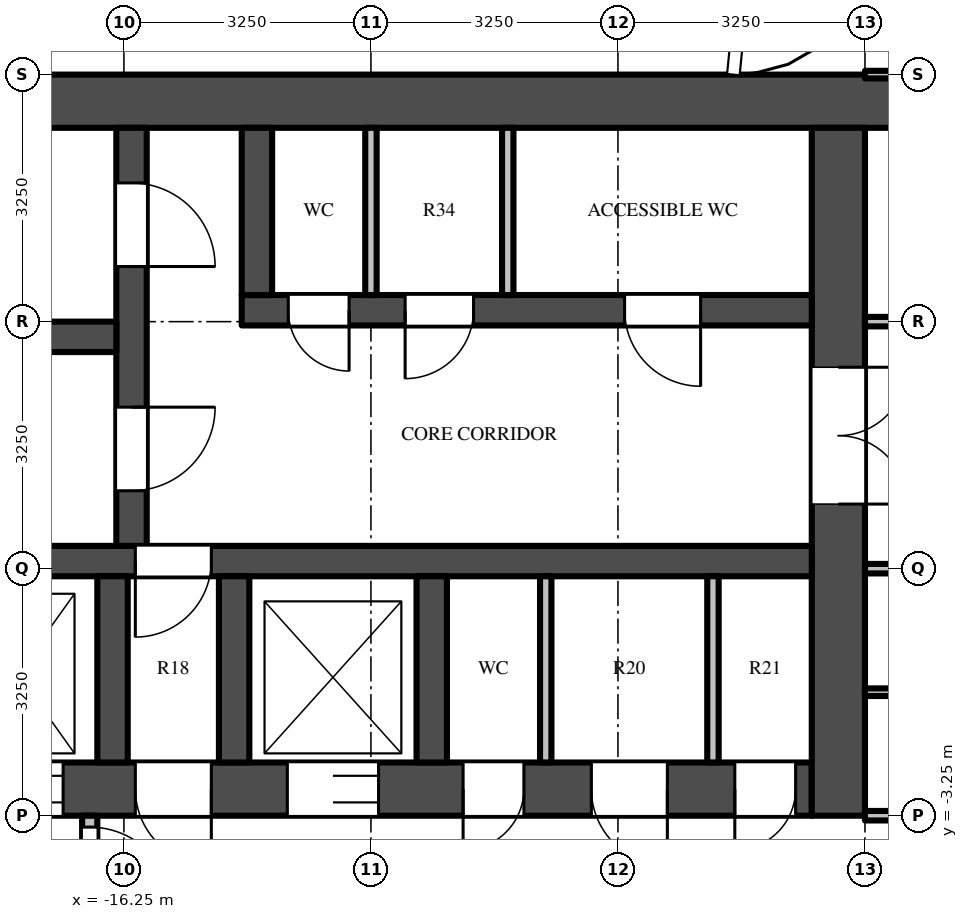
"""IFC4 building model, lengths in metres.
Left out: names, types, materials, properties, quantities, classifications, styles, units other than length and angle.
Written with IfcOpenShell. Run it as: python <this file> out.ifc"""

import sys

from ifc_helpers import new_model, si_unit, direction, frame, frame_2d, origin, place, context, subcontext, project, spatial, rectangle, extrude, source, transform, mapped, element, fill, save


model = new_model("IFC4")
c1 = context("Model", 3, precision=1e-05, world=origin(), true_north=direction((0.0, 1.0)))
c2 = subcontext(c1, "Body", "Model", "MODEL_VIEW")
j1 = project(units=[si_unit("LENGTHUNIT", "METRE"), si_unit("PLANEANGLEUNIT", "RADIAN")], contexts=[c1])
p1 = place(None, origin())
s1 = spatial("IfcSite", under=j1, at=p1, CompositionType="ELEMENT")
p2 = place(p1, origin())
s2 = spatial("IfcBuilding", under=s1, at=p2, CompositionType="ELEMENT")
p3 = place(p2, frame((0.0, 0.0, 291.1)))
s3 = spatial("IfcBuildingStorey", under=s2, at=p3, CompositionType="ELEMENT", Elevation=291.1)
m1 = source(origin(), c2, "Body", "SweptSolid", [
    extrude(rectangle(XDim=16.65, YDim=0.7, at=frame_2d((8.325, 0.0))), origin(), (0.0, 0.0, 1.0), 3.7),
])
p4 = place(p3, frame((-6.1, 6.15, 0.0), z_axis=(0.0, 0.0, 1.0), x_axis=(-1.0, 0.0, 0.0)))
e1 = element("IfcWall", 1, at=p4, inside=s3, PredefinedType="SHEAR", context=c2, shape_type="MappedRepresentation", body=[
    mapped(m1, transform((0.0, 0.0, 0.0))),
])
m2 = source(origin(), c2, "Body", "SweptSolid", [
    extrude(rectangle(XDim=14.85, YDim=0.7, at=frame_2d((7.425, 0.0))), origin(), (0.0, 0.0, 1.0), 3.7),
])
p5 = place(p3, frame((-7.2, -2.9, 0.0), z_axis=(0.0, 0.0, 1.0), x_axis=(-1.0, 0.0, 0.0)))
e2 = element("IfcWall", 2, at=p5, inside=s3, PredefinedType="SHEAR", context=c2, shape_type="MappedRepresentation", body=[
    mapped(m2, transform((0.0, 0.0, 0.0))),
])
m3 = source(origin(), c2, "Body", "SweptSolid", [
    extrude(rectangle(XDim=1.2, YDim=2.1, at=frame_2d((0.6, 1.05))), frame((0.0, 0.36, 0.0), z_axis=(0.0, -1.0, 0.0), x_axis=(1.0, 0.0, 0.0)), (0.0, 0.0, 1.0), 0.72),
])
p6 = place(p5, frame((5.7, 0.0, 0.0)))
e3 = element("IfcOpeningElement", 3, at=p6, cuts=e2, PredefinedType="OPENING", context=c2, shape_type="MappedRepresentation", body=[
    mapped(m3, transform((0.0, 0.0, 0.0))),
])
m4 = source(origin(), c2, "Body", "SweptSolid", [
    extrude(rectangle(XDim=1.3, YDim=2.1, at=frame_2d((0.65, 1.05))), frame((0.0, 0.36, 0.0), z_axis=(0.0, -1.0, 0.0), x_axis=(1.0, 0.0, 0.0)), (0.0, 0.0, 1.0), 0.72),
])
p7 = place(p5, frame((12.2, 0.0, 0.0)))
e4 = element("IfcOpeningElement", 4, at=p7, cuts=e2, PredefinedType="OPENING", context=c2, shape_type="MappedRepresentation", body=[
    mapped(m4, transform((0.0, 0.0, 0.0))),
])
p8 = place(p5, frame((9.85, 0.0, 0.0)))
e5 = element("IfcOpeningElement", 5, at=p8, cuts=e2, PredefinedType="OPENING", context=c2, shape_type="MappedRepresentation", body=[
    mapped(m3, transform((0.0, 0.0, 0.0))),
])
m5 = source(origin(), c2, "Body", "SweptSolid", [
    extrude(rectangle(XDim=1.0, YDim=2.1, at=frame_2d((0.5, 1.05))), frame((0.0, 0.36, 0.0), z_axis=(0.0, -1.0, 0.0), x_axis=(1.0, 0.0, 0.0)), (0.0, 0.0, 1.0), 0.72),
])
p9 = place(p5, frame((7.9, 0.0, 0.0)))
e6 = element("IfcOpeningElement", 6, at=p9, cuts=e2, PredefinedType="OPENING", context=c2, shape_type="MappedRepresentation", body=[
    mapped(m5, transform((0.0, 0.0, 0.0))),
])
m6 = source(origin(), c2, "Body", "SweptSolid", [
    extrude(rectangle(XDim=0.8, YDim=2.1, at=frame_2d((0.4, 1.05))), frame((0.0, 0.36, 0.0), z_axis=(0.0, -1.0, 0.0), x_axis=(1.0, 0.0, 0.0)), (0.0, 0.0, 1.0), 0.72),
])
p10 = place(p5, frame((0.212, 0.0, 0.0)))
e7 = element("IfcOpeningElement", 7, at=p10, cuts=e2, PredefinedType="OPENING", context=c2, shape_type="MappedRepresentation", body=[
    mapped(m6, transform((0.0, 0.0, 0.0))),
])
p11 = place(p5, frame((1.9, 0.0, 0.0)))
e8 = element("IfcOpeningElement", 8, at=p11, cuts=e2, PredefinedType="OPENING", context=c2, shape_type="MappedRepresentation", body=[
    mapped(m5, transform((0.0, 0.0, 0.0))),
])
p12 = place(p5, frame((3.788, 0.0, 0.0)))
e9 = element("IfcOpeningElement", 9, at=p12, cuts=e2, PredefinedType="OPENING", context=c2, shape_type="MappedRepresentation", body=[
    mapped(m6, transform((0.0, 0.0, 0.0))),
])
m7 = source(origin(), c2, "Body", "SweptSolid", [
    extrude(rectangle(XDim=9.05, YDim=0.7, at=frame_2d((4.525, 0.0))), origin(), (0.0, 0.0, 1.0), 3.7),
])
p13 = place(p3, frame((-6.85, 5.8, 0.0), z_axis=(0.0, 0.0, 1.0), x_axis=(0.0, -1.0, 0.0)))
e10 = element("IfcWall", 10, at=p13, inside=s3, PredefinedType="SHEAR", context=c2, shape_type="MappedRepresentation", body=[
    mapped(m7, transform((0.0, 0.0, 0.0))),
])
m8 = source(origin(), c2, "Body", "SweptSolid", [
    extrude(rectangle(XDim=1.8, YDim=2.1, at=frame_2d((0.9, 1.05))), frame((0.0, 0.36, 0.0), z_axis=(0.0, -1.0, 0.0), x_axis=(1.0, 0.0, 0.0)), (0.0, 0.0, 1.0), 0.72),
])
p14 = place(p13, frame((3.15, 0.0, 0.0)))
e11 = element("IfcOpeningElement", 11, at=p14, cuts=e10, PredefinedType="OPENING", context=c2, shape_type="MappedRepresentation", body=[
    mapped(m8, transform((0.0, 0.0, 0.0))),
])
m9 = source(origin(), c2, "Body", "SweptSolid", [
    extrude(rectangle(XDim=7.5, YDim=0.4, at=frame_2d((3.75, 0.0))), origin(), (0.0, 0.0, 1.0), 3.7),
])
p15 = place(p3, frame((-7.2, 3.4, 0.0), z_axis=(0.0, 0.0, 1.0), x_axis=(-1.0, 0.0, 0.0)))
e12 = element("IfcWall", 12, at=p15, inside=s3, PredefinedType="SHEAR", context=c2, shape_type="MappedRepresentation", body=[
    mapped(m9, transform((0.0, 0.0, 0.0))),
])
m10 = source(origin(), c2, "Body", "SweptSolid", [
    extrude(rectangle(XDim=1.0, YDim=2.1, at=frame_2d((0.5, 1.05))), frame((0.0, 0.21, 0.0), z_axis=(0.0, -1.0, 0.0), x_axis=(1.0, 0.0, 0.0)), (0.0, 0.0, 1.0), 0.42),
])
p16 = place(p15, frame((1.462, 0.0, 0.0)))
e13 = element("IfcOpeningElement", 13, at=p16, cuts=e12, PredefinedType="OPENING", context=c2, shape_type="MappedRepresentation", body=[
    mapped(m10, transform((0.0, 0.0, 0.0))),
])
m11 = source(origin(), c2, "Body", "SweptSolid", [
    extrude(rectangle(XDim=0.9, YDim=2.1, at=frame_2d((0.45, 1.05))), frame((0.0, 0.21, 0.0), z_axis=(0.0, -1.0, 0.0), x_axis=(1.0, 0.0, 0.0)), (0.0, 0.0, 1.0), 0.42),
])
p17 = place(p15, frame((4.45, 0.0, 0.0)))
e14 = element("IfcOpeningElement", 14, at=p17, cuts=e12, PredefinedType="OPENING", context=c2, shape_type="MappedRepresentation", body=[
    mapped(m11, transform((0.0, 0.0, 0.0))),
])
m12 = source(origin(), c2, "Body", "SweptSolid", [
    extrude(rectangle(XDim=0.8, YDim=2.1, at=frame_2d((0.4, 1.05))), frame((0.0, 0.21, 0.0), z_axis=(0.0, -1.0, 0.0), x_axis=(1.0, 0.0, 0.0)), (0.0, 0.0, 1.0), 0.42),
])
p18 = place(p15, frame((6.087, 0.0, 0.0)))
e15 = element("IfcOpeningElement", 15, at=p18, cuts=e12, PredefinedType="OPENING", context=c2, shape_type="MappedRepresentation", body=[
    mapped(m12, transform((0.0, 0.0, 0.0))),
])
m13 = source(origin(), c2, "Body", "SweptSolid", [
    extrude(rectangle(XDim=14.85, YDim=0.4, at=frame_2d((7.425, 0.0))), origin(), (0.0, 0.0, 1.0), 3.7),
])
p19 = place(p3, frame((-7.2, 0.1, 0.0), z_axis=(0.0, 0.0, 1.0), x_axis=(-1.0, 0.0, 0.0)))
e16 = element("IfcWall", 16, at=p19, inside=s3, PredefinedType="SHEAR", context=c2, shape_type="MappedRepresentation", body=[
    mapped(m13, transform((0.0, 0.0, 0.0))),
])
p20 = place(p19, frame((7.9, 0.0, 0.0)))
e17 = element("IfcOpeningElement", 17, at=p20, cuts=e16, PredefinedType="OPENING", context=c2, shape_type="MappedRepresentation", body=[
    mapped(m10, transform((0.0, 0.0, 0.0))),
])
m14 = source(origin(), c2, "Body", "SweptSolid", [
    extrude(rectangle(XDim=5.5, YDim=0.4, at=frame_2d((2.75, 0.0))), origin(), (0.0, 0.0, 1.0), 3.7),
])
p21 = place(p3, frame((-16.15, 5.8, 0.0), z_axis=(0.0, 0.0, 1.0), x_axis=(0.0, -1.0, 0.0)))
e18 = element("IfcWall", 18, at=p21, inside=s3, PredefinedType="SHEAR", context=c2, shape_type="MappedRepresentation", body=[
    mapped(m14, transform((0.0, 0.0, 0.0))),
])
m15 = source(origin(), c2, "Body", "SweptSolid", [
    extrude(rectangle(XDim=1.1, YDim=2.1, at=frame_2d((0.55, 1.05))), frame((0.0, 0.21, 0.0), z_axis=(0.0, -1.0, 0.0), x_axis=(1.0, 0.0, 0.0)), (0.0, 0.0, 1.0), 0.42),
])
p22 = place(p21, frame((0.725, 0.0, 0.0)))
e19 = element("IfcOpeningElement", 19, at=p22, cuts=e18, PredefinedType="OPENING", context=c2, shape_type="MappedRepresentation", body=[
    mapped(m15, transform((0.0, 0.0, 0.0))),
])
p23 = place(p21, frame((3.675, 0.0, 0.0)))
e20 = element("IfcOpeningElement", 20, at=p23, cuts=e18, PredefinedType="OPENING", context=c2, shape_type="MappedRepresentation", body=[
    mapped(m15, transform((0.0, 0.0, 0.0))),
])
m16 = source(origin(), c2, "Body", "SweptSolid", [
    extrude(rectangle(XDim=5.7, YDim=0.4, at=frame_2d((2.85, 0.0))), origin(), (0.0, 0.0, 1.0), 3.7),
])
p24 = place(p3, frame((-16.35, 3.05, 0.0), z_axis=(0.0, 0.0, 1.0), x_axis=(-1.0, 0.0, 0.0)))
e21 = element("IfcWall", 21, at=p24, inside=s3, PredefinedType="SHEAR", context=c2, shape_type="MappedRepresentation", body=[
    mapped(m16, transform((0.0, 0.0, 0.0))),
])
m17 = source(origin(), c2, "Body", "SweptSolid", [
    extrude(rectangle(XDim=2.2, YDim=0.4, at=frame_2d((1.1, 0.0))), origin(), (0.0, 0.0, 1.0), 3.7),
])
p25 = place(p3, frame((-14.5, 5.8, 0.0), z_axis=(0.0, 0.0, 1.0), x_axis=(0.0, -1.0, 0.0)))
e22 = element("IfcWall", 22, at=p25, inside=s3, PredefinedType="SHEAR", context=c2, shape_type="MappedRepresentation", body=[
    mapped(m17, transform((0.0, 0.0, 0.0))),
])
m18 = source(origin(), c2, "Body", "SweptSolid", [
    extrude(rectangle(XDim=2.45, YDim=0.4, at=frame_2d((1.225, 0.0))), origin(), (0.0, 0.0, 1.0), 3.7),
])
for number, where, z_axis, x_axis in (
    (23, (-12.2, -0.1, 0.0), (0.0, 0.0, 1.0), (0.0, -1.0, 0.0)),
    (24, (-14.8, -0.1, 0.0), (0.0, 0.0, 1.0), (0.0, -1.0, 0.0)),
    (25, (-16.4, -0.1, 0.0), (0.0, 0.0, 1.0), (0.0, -1.0, 0.0)),
):
    element("IfcWall", number, at=place(p3, frame(where, z_axis=z_axis, x_axis=x_axis)), inside=s3, PredefinedType="SHEAR", context=c2, shape_type="MappedRepresentation", body=[
        mapped(m18, transform((0.0, 0.0, 0.0))),
    ])
m19 = source(origin(), c2, "Body", "SweptSolid", [
    extrude(rectangle(XDim=3.25, YDim=0.2, at=frame_2d((1.625, 0.0))), origin(), (0.0, 0.0, 1.0), 3.7),
])
p26 = place(p3, frame((-16.7, -3.25, 0.0), z_axis=(0.0, 0.0, 1.0), x_axis=(0.0, -1.0, 0.0)))
e26 = element("IfcWall", 26, at=p26, inside=s3, PredefinedType="PARTITIONING", context=c2, shape_type="MappedRepresentation", body=[
    mapped(m19, transform((0.0, 0.0, 0.0))),
])
m20 = source(origin(), c2, "Body", "SweptSolid", [
    extrude(rectangle(XDim=1.1, YDim=2.1, at=frame_2d((0.55, 1.05))), frame((0.0, 0.11, 0.0), z_axis=(0.0, -1.0, 0.0), x_axis=(1.0, 0.0, 0.0)), (0.0, 0.0, 1.0), 0.22),
])
p27 = place(p26, frame((0.15, 0.0, 0.0)))
e27 = element("IfcOpeningElement", 27, at=p27, cuts=e26, PredefinedType="OPENING", context=c2, shape_type="MappedRepresentation", body=[
    mapped(m20, transform((0.0, 0.0, 0.0))),
])
m21 = source(origin(), c2, "Body", "SweptSolid", [
    extrude(rectangle(XDim=2.2, YDim=0.15, at=frame_2d((1.1, 0.0))), origin(), (0.0, 0.0, 1.0), 3.7),
])
for number, where, z_axis, x_axis in (
    (28, (-11.2, 5.8, 0.0), (0.0, 0.0, 1.0), (0.0, -1.0, 0.0)),
    (29, (-13.0, 5.8, 0.0), (0.0, 0.0, 1.0), (0.0, -1.0, 0.0)),
):
    element("IfcWall", number, at=place(p3, frame(where, z_axis=z_axis, x_axis=x_axis)), inside=s3, PredefinedType="PARTITIONING", context=c2, shape_type="MappedRepresentation", body=[
        mapped(m21, transform((0.0, 0.0, 0.0))),
    ])
m22 = source(origin(), c2, "Body", "SweptSolid", [
    extrude(rectangle(XDim=2.45, YDim=0.15, at=frame_2d((1.225, 0.0))), origin(), (0.0, 0.0, 1.0), 3.7),
])
for number, where, z_axis, x_axis in (
    (30, (-8.5, -0.1, 0.0), (0.0, 0.0, 1.0), (0.0, -1.0, 0.0)),
    (31, (-10.7, -0.1, 0.0), (0.0, 0.0, 1.0), (0.0, -1.0, 0.0)),
):
    element("IfcWall", number, at=place(p3, frame(where, z_axis=z_axis, x_axis=x_axis)), inside=s3, PredefinedType="PARTITIONING", context=c2, shape_type="MappedRepresentation", body=[
        mapped(m22, transform((0.0, 0.0, 0.0))),
    ])
m23 = source(origin(), c2, "Body", "SweptSolid", [
    extrude(rectangle(XDim=5.363, YDim=0.125, at=frame_2d((2.681, 0.0))), origin(), (0.0, 0.0, 1.0), 2.997),
])
p28 = place(p3, frame((-1.137, -3.25, 0.0), z_axis=(0.0, 0.0, 1.0), x_axis=(-1.0, 0.0, 0.0)))
e32 = element("IfcWall", 32, at=p28, inside=s3, PredefinedType="PARTITIONING", context=c2, shape_type="MappedRepresentation", body=[
    mapped(m23, transform((0.0, 0.0, 0.0))),
])
m24 = source(origin(), c2, "Body", "SweptSolid", [
    extrude(rectangle(XDim=1.0, YDim=2.1, at=frame_2d((0.5, 1.05))), frame((0.0, 0.073, 0.0), z_axis=(0.0, -1.0, 0.0), x_axis=(1.0, 0.0, 0.0)), (0.0, 0.0, 1.0), 0.145),
])
p29 = place(p28, frame((4.012, 0.0, 0.0)))
e33 = element("IfcOpeningElement", 33, at=p29, cuts=e32, PredefinedType="OPENING", context=c2, shape_type="MappedRepresentation", body=[
    mapped(m24, transform((0.0, 0.0, 0.0))),
])
m25 = source(origin(), c2, "Body", "SweptSolid", [
    extrude(rectangle(XDim=5.238, YDim=0.1, at=frame_2d((2.619, 0.0))), origin(), (0.0, 0.0, 1.0), 2.997),
])
p30 = place(p3, frame((-6.5, -1.625, 0.0), z_axis=(0.0, 0.0, 1.0), x_axis=(1.0, 0.0, 0.0)))
e34 = element("IfcWall", 34, at=p30, inside=s3, PredefinedType="PARTITIONING", context=c2, shape_type="MappedRepresentation", body=[
    mapped(m25, transform((0.0, 0.0, 0.0))),
])
p31 = place(p3, frame((-1.137, 0.0, 0.0), z_axis=(0.0, 0.0, 1.0), x_axis=(-1.0, 0.0, 0.0)))
e35 = element("IfcWall", 35, at=p31, inside=s3, PredefinedType="PARTITIONING", context=c2, shape_type="MappedRepresentation", body=[
    mapped(m23, transform((0.0, 0.0, 0.0))),
])
p32 = place(p31, frame((4.012, 0.0, 0.0)))
e36 = element("IfcOpeningElement", 36, at=p32, cuts=e35, PredefinedType="OPENING", context=c2, shape_type="MappedRepresentation", body=[
    mapped(m24, transform((0.0, 0.0, 0.0))),
])
p33 = place(p3, frame((-6.5, 3.25, 0.0), z_axis=(0.0, 0.0, 1.0), x_axis=(1.0, 0.0, 0.0)))
e37 = element("IfcWall", 37, at=p33, inside=s3, PredefinedType="PARTITIONING", context=c2, shape_type="MappedRepresentation", body=[
    mapped(m23, transform((0.0, 0.0, 0.0))),
])
p34 = place(p33, frame((1.3, 0.0, 0.0)))
e38 = element("IfcOpeningElement", 38, at=p34, cuts=e37, PredefinedType="OPENING", context=c2, shape_type="MappedRepresentation", body=[
    mapped(m24, transform((0.0, 0.0, 0.0))),
])
m26 = source(origin(), c2, "Body", "SweptSolid", [
    extrude(rectangle(XDim=5.238, YDim=0.1, at=frame_2d((2.619, 0.0))), origin(), (0.0, 0.0, 1.0), 2.78),
])
p35 = place(p3, frame((-6.5, 6.5, 0.0), z_axis=(0.0, 0.0, 1.0), x_axis=(1.0, 0.0, 0.0)))
e39 = element("IfcWall", 39, at=p35, inside=s3, PredefinedType="PARTITIONING", context=c2, shape_type="MappedRepresentation", body=[
    mapped(m26, transform((0.0, 0.0, 0.0))),
])
m27 = source(origin(), c2, "Body", "SweptSolid", [
    extrude(rectangle(XDim=1.2, YDim=2.1, at=frame_2d((0.6, 1.05))), frame((0.0, -0.275, 0.0), z_axis=(0.0, -1.0, 0.0), x_axis=(1.0, 0.0, 0.0)), (0.0, 0.0, 1.0), 0.05),
])
p36 = place(p6, origin())
e40 = element("IfcDoor", 40, at=p36, inside=s3, OperationType="DOUBLE_DOOR_SLIDING", PredefinedType="DOOR", context=c2, shape_type="MappedRepresentation", body=[
    mapped(m27, transform((0.0, 0.0, 0.0))),
])
fill(e3, e40)
p37 = place(p8, origin())
e41 = element("IfcDoor", 41, at=p37, inside=s3, OperationType="DOUBLE_DOOR_SLIDING", PredefinedType="DOOR", context=c2, shape_type="MappedRepresentation", body=[
    mapped(m27, transform((0.0, 0.0, 0.0))),
])
fill(e5, e41)
m28 = source(origin(), c2, "Body", "SweptSolid", [
    extrude(rectangle(XDim=1.8, YDim=2.1, at=frame_2d((0.9, 1.05))), frame((0.0, -0.275, 0.0), z_axis=(0.0, -1.0, 0.0), x_axis=(1.0, 0.0, 0.0)), (0.0, 0.0, 1.0), 0.05),
])
p38 = place(p14, origin())
e42 = element("IfcDoor", 42, at=p38, inside=s3, OperationType="DOUBLE_DOOR_SINGLE_SWING", PredefinedType="DOOR", context=c2, shape_type="MappedRepresentation", body=[
    mapped(m28, transform((0.0, 0.0, 0.0))),
])
fill(e11, e42)
m29 = source(origin(), c2, "Body", "SweptSolid", [
    extrude(rectangle(XDim=1.1, YDim=2.1, at=frame_2d((0.55, 1.05))), frame((0.0, 0.025, 0.0), z_axis=(0.0, -1.0, 0.0), x_axis=(1.0, 0.0, 0.0)), (0.0, 0.0, 1.0), 0.05),
])
p39 = place(p22, origin())
e43 = element("IfcDoor", 43, at=p39, inside=s3, OperationType="SINGLE_SWING_RIGHT", PredefinedType="DOOR", context=c2, shape_type="MappedRepresentation", body=[
    mapped(m29, transform((0.0, 0.0, 0.0))),
])
fill(e19, e43)
p40 = place(p23, origin())
e44 = element("IfcDoor", 44, at=p40, inside=s3, OperationType="SINGLE_SWING_LEFT", PredefinedType="DOOR", context=c2, shape_type="MappedRepresentation", body=[
    mapped(m29, transform((0.0, 0.0, 0.0))),
])
fill(e20, e44)
m30 = source(origin(), c2, "Body", "SweptSolid", [
    extrude(rectangle(XDim=1.0, YDim=2.1, at=frame_2d((0.5, 1.05))), frame((0.0, 0.025, 0.0), z_axis=(0.0, -1.0, 0.0), x_axis=(1.0, 0.0, 0.0)), (0.0, 0.0, 1.0), 0.05),
])
p41 = place(p20, origin())
e45 = element("IfcDoor", 45, at=p41, inside=s3, OperationType="SINGLE_SWING_RIGHT", PredefinedType="DOOR", context=c2, shape_type="MappedRepresentation", body=[
    mapped(m30, transform((0.0, 0.0, 0.0))),
])
fill(e17, e45)
m31 = source(origin(), c2, "Body", "SweptSolid", [
    extrude(rectangle(XDim=1.0, YDim=2.1, at=frame_2d((0.5, 1.05))), frame((0.0, -0.275, 0.0), z_axis=(0.0, -1.0, 0.0), x_axis=(1.0, 0.0, 0.0)), (0.0, 0.0, 1.0), 0.05),
])
p42 = place(p9, origin())
e46 = element("IfcDoor", 46, at=p42, inside=s3, OperationType="SINGLE_SWING_LEFT", PredefinedType="DOOR", context=c2, shape_type="MappedRepresentation", body=[
    mapped(m31, transform((0.0, 0.0, 0.0))),
])
fill(e6, e46)
p43 = place(p27, origin())
e47 = element("IfcDoor", 47, at=p43, inside=s3, OperationType="SINGLE_SWING_RIGHT", PredefinedType="DOOR", context=c2, shape_type="MappedRepresentation", body=[
    mapped(m29, transform((0.0, 0.0, 0.0))),
])
fill(e27, e47)
p44 = place(p16, origin())
e48 = element("IfcDoor", 48, at=p44, inside=s3, OperationType="SINGLE_SWING_LEFT", PredefinedType="DOOR", context=c2, shape_type="MappedRepresentation", body=[
    mapped(m30, transform((0.0, 0.0, 0.0))),
])
fill(e13, e48)
m32 = source(origin(), c2, "Body", "SweptSolid", [
    extrude(rectangle(XDim=0.9, YDim=2.1, at=frame_2d((0.45, 1.05))), frame((0.0, 0.025, 0.0), z_axis=(0.0, -1.0, 0.0), x_axis=(1.0, 0.0, 0.0)), (0.0, 0.0, 1.0), 0.05),
])
p45 = place(p17, origin())
e49 = element("IfcDoor", 49, at=p45, inside=s3, OperationType="SINGLE_SWING_RIGHT", PredefinedType="DOOR", context=c2, shape_type="MappedRepresentation", body=[
    mapped(m32, transform((0.0, 0.0, 0.0))),
])
fill(e14, e49)
m33 = source(origin(), c2, "Body", "SweptSolid", [
    extrude(rectangle(XDim=0.8, YDim=2.1, at=frame_2d((0.4, 1.05))), frame((0.0, 0.025, 0.0), z_axis=(0.0, -1.0, 0.0), x_axis=(1.0, 0.0, 0.0)), (0.0, 0.0, 1.0), 0.05),
])
p46 = place(p18, origin())
e50 = element("IfcDoor", 50, at=p46, inside=s3, OperationType="SINGLE_SWING_LEFT", PredefinedType="DOOR", context=c2, shape_type="MappedRepresentation", body=[
    mapped(m33, transform((0.0, 0.0, 0.0))),
])
fill(e15, e50)
m34 = source(origin(), c2, "Body", "SweptSolid", [
    extrude(rectangle(XDim=0.8, YDim=2.1, at=frame_2d((0.4, 1.05))), frame((0.0, -0.275, 0.0), z_axis=(0.0, -1.0, 0.0), x_axis=(1.0, 0.0, 0.0)), (0.0, 0.0, 1.0), 0.05),
])
p47 = place(p10, origin())
e51 = element("IfcDoor", 51, at=p47, inside=s3, OperationType="SINGLE_SWING_RIGHT", PredefinedType="DOOR", context=c2, shape_type="MappedRepresentation", body=[
    mapped(m34, transform((0.0, 0.0, 0.0))),
])
fill(e7, e51)
p48 = place(p11, origin())
e52 = element("IfcDoor", 52, at=p48, inside=s3, OperationType="SINGLE_SWING_LEFT", PredefinedType="DOOR", context=c2, shape_type="MappedRepresentation", body=[
    mapped(m31, transform((0.0, 0.0, 0.0))),
])
fill(e8, e52)
p49 = place(p12, origin())
e53 = element("IfcDoor", 53, at=p49, inside=s3, OperationType="SINGLE_SWING_RIGHT", PredefinedType="DOOR", context=c2, shape_type="MappedRepresentation", body=[
    mapped(m34, transform((0.0, 0.0, 0.0))),
])
fill(e9, e53)
save(model, sys.argv[1])
